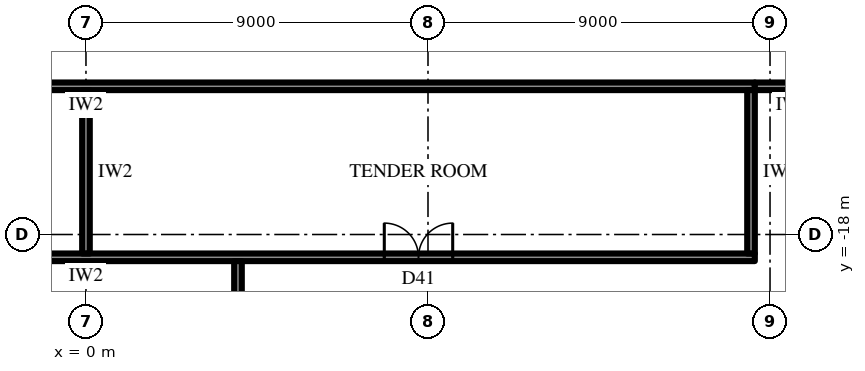
"""IFC4 building model, lengths in metres.
Left out: names, types, materials, properties, quantities, classifications, styles, units other than length and angle.
Written with IfcOpenShell. Run it as: python <this file> out.ifc"""

import sys

from ifc_helpers import new_model, si_unit, direction, frame, frame_2d, origin, place, context, subcontext, project, spatial, rectangle, extrude, element, fill, save


model = new_model("IFC4")
c1 = context("Model", 3, precision=1e-05, world=origin(), true_north=direction((0.0, 1.0)))
c2 = subcontext(c1, "Body", "Model", "MODEL_VIEW")
j1 = project(units=[si_unit("LENGTHUNIT", "METRE"), si_unit("PLANEANGLEUNIT", "RADIAN")], contexts=[c1])
p1 = place(None, origin())
s1 = spatial("IfcSite", under=j1, at=p1, CompositionType="ELEMENT")
p2 = place(p1, origin())
s2 = spatial("IfcBuilding", under=s1, at=p2, CompositionType="ELEMENT")
p3 = place(p2, frame((0.0, 0.0, 73.9)))
s3 = spatial("IfcBuildingStorey", under=s2, at=p3, CompositionType="ELEMENT", Elevation=73.9)
p4 = place(p3, frame((17.6, -14.1, 0.0), z_axis=(0.0, 0.0, 1.0), x_axis=(-1.0, 0.0, 0.0)))
e1 = element("IfcWall", 1, at=p4, inside=s3, PredefinedType="PARTITIONING", context=c2, shape_type="SweptSolid", body=[
    extrude(rectangle(XDim=35.2, YDim=0.2, at=frame_2d((17.6, 0.0))), origin(), (0.0, 0.0, 1.0), 4.0),
])
p5 = place(p3, frame((17.6, -18.6, 0.0), z_axis=(0.0, 0.0, 1.0), x_axis=(-1.0, 0.0, 0.0)))
e2 = element("IfcWall", 2, at=p5, inside=s3, PredefinedType="PARTITIONING", context=c2, shape_type="SweptSolid", body=[
    extrude(rectangle(XDim=35.2, YDim=0.2, at=frame_2d((17.6, 0.0))), origin(), (0.0, 0.0, 1.0), 4.0),
])
p6 = place(p5, frame((7.95, 0.0, 0.0)))
e3 = element("IfcOpeningElement", 3, at=p6, cuts=e2, PredefinedType="OPENING", context=c2, shape_type="SweptSolid", body=[
    extrude(rectangle(XDim=1.8, YDim=2.4, at=frame_2d((0.9, 1.2))), frame((0.0, 0.11, 0.0), z_axis=(0.0, -1.0, 0.0), x_axis=(1.0, 0.0, 0.0)), (0.0, 0.0, 1.0), 0.22),
])
p7 = place(p5, frame((25.45, 0.0, 0.0)))
e4 = element("IfcOpeningElement", 4, at=p7, cuts=e2, PredefinedType="OPENING", context=c2, shape_type="SweptSolid", body=[
    extrude(rectangle(XDim=1.8, YDim=2.4, at=frame_2d((0.9, 1.2))), frame((0.0, 0.11, 0.0), z_axis=(0.0, -1.0, 0.0), x_axis=(1.0, 0.0, 0.0)), (0.0, 0.0, 1.0), 0.22),
])
p8 = place(p3, frame((17.5, -14.2, 0.0), z_axis=(0.0, 0.0, 1.0), x_axis=(0.0, -1.0, 0.0)))
e5 = element("IfcWall", 5, at=p8, inside=s3, PredefinedType="PARTITIONING", context=c2, shape_type="SweptSolid", body=[
    extrude(rectangle(XDim=4.3, YDim=0.2, at=frame_2d((2.15, 0.0))), origin(), (0.0, 0.0, 1.0), 4.0),
])
p9 = place(p3, frame((0.0, -14.2, 0.0), z_axis=(0.0, 0.0, 1.0), x_axis=(0.0, -1.0, 0.0)))
e6 = element("IfcWall", 6, at=p9, inside=s3, PredefinedType="PARTITIONING", context=c2, shape_type="SweptSolid", body=[
    extrude(rectangle(XDim=4.3, YDim=0.2, at=frame_2d((2.15, 0.0))), origin(), (0.0, 0.0, 1.0), 2.944),
])
p10 = place(p3, frame((19.6, -14.1, 0.0), z_axis=(0.0, 0.0, 1.0), x_axis=(-1.0, 0.0, 0.0)))
e7 = element("IfcWall", 7, at=p10, inside=s3, PredefinedType="PARTITIONING", context=c2, shape_type="SweptSolid", body=[
    extrude(rectangle(XDim=2.0, YDim=0.2, at=frame_2d((1.0, 0.0))), origin(), (0.0, 0.0, 1.0), 4.0),
])
p11 = place(p3, frame((4.0, -18.7, 0.0), z_axis=(0.0, 0.0, 1.0), x_axis=(0.0, -1.0, 0.0)))
e8 = element("IfcWall", 8, at=p11, inside=s3, PredefinedType="PARTITIONING", context=c2, shape_type="SweptSolid", body=[
    extrude(rectangle(XDim=15.1, YDim=0.2, at=frame_2d((7.55, 0.0))), origin(), (0.0, 0.0, 1.0), 4.0),
])
p12 = place(p11, frame((1.01, 0.0, 0.0)))
e9 = element("IfcOpeningElement", 9, at=p12, cuts=e8, PredefinedType="OPENING", context=c2, shape_type="SweptSolid", body=[
    extrude(rectangle(XDim=1.0, YDim=2.2, at=frame_2d((0.5, 1.1))), frame((0.0, 0.11, 0.0), z_axis=(0.0, -1.0, 0.0), x_axis=(1.0, 0.0, 0.0)), (0.0, 0.0, 1.0), 0.22),
])
p13 = place(p6, frame((1.8, 0.0, 0.0), z_axis=(0.0, 0.0, 1.0), x_axis=(-1.0, 0.0, 0.0)))
e10 = element("IfcDoor", 10, at=p13, inside=s3, OperationType="DOUBLE_DOOR_SINGLE_SWING", PredefinedType="DOOR", context=c2, shape_type="SweptSolid", body=[
    extrude(rectangle(XDim=1.8, YDim=2.4, at=frame_2d((0.9, 1.2))), frame((0.0, 0.025, 0.0), z_axis=(0.0, -1.0, 0.0), x_axis=(1.0, 0.0, 0.0)), (0.0, 0.0, 1.0), 0.05),
])
fill(e3, e10)
save(model, sys.argv[1])
